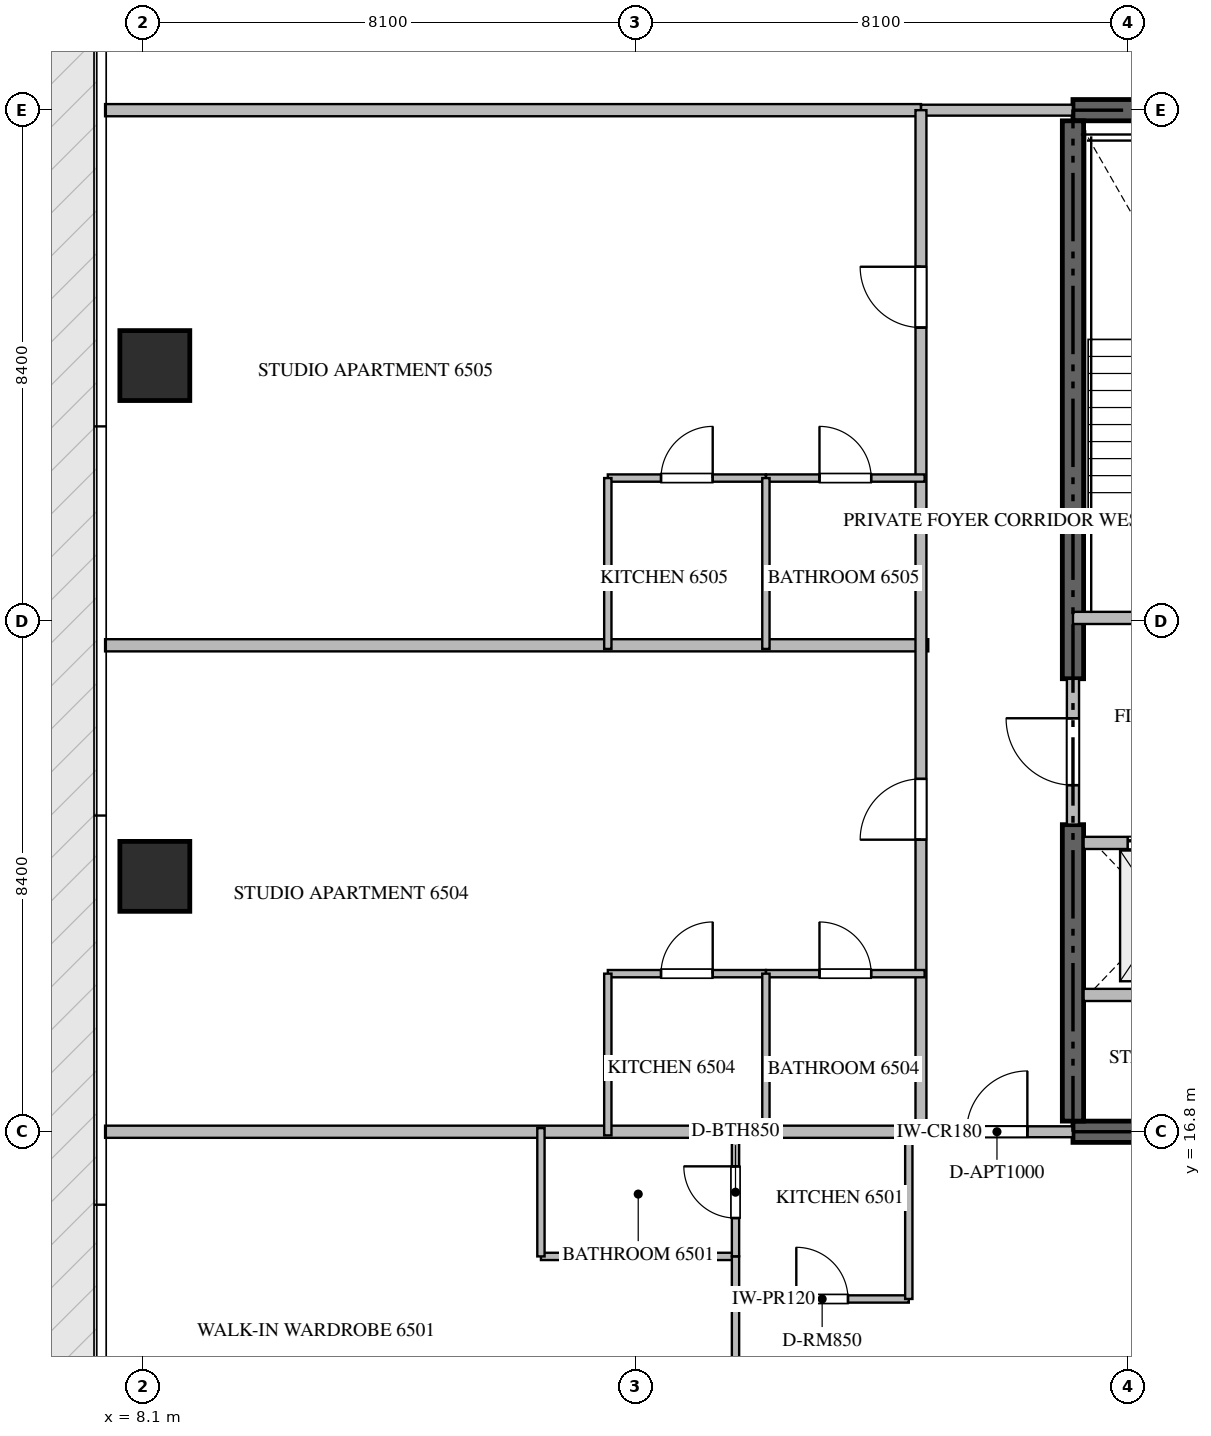
"""IFC4 building model, lengths in metres.
Left out: names, types, materials, properties, quantities, classifications, styles, units other than length and angle.
Written with IfcOpenShell. Run it as: python <this file> out.ifc"""

import sys

from ifc_helpers import new_model, si_unit, direction, frame, frame_2d, origin, origin_2d, place, context, subcontext, project, spatial, rectangle, extrude, source, transform, mapped, element, fill, save


model = new_model("IFC4")
c1 = context("Model", 3, precision=1e-05, world=origin(), true_north=direction((0.0, 1.0)))
c2 = subcontext(c1, "Body", "Model", "MODEL_VIEW")
j1 = project(units=[si_unit("LENGTHUNIT", "METRE"), si_unit("PLANEANGLEUNIT", "RADIAN")], contexts=[c1])
p1 = place(None, origin())
s1 = spatial("IfcSite", under=j1, at=p1, CompositionType="ELEMENT")
p2 = place(p1, origin())
s2 = spatial("IfcBuilding", under=s1, at=p2, CompositionType="ELEMENT")
p3 = place(p2, frame((0.0, 0.0, 260.5)))
s3 = spatial("IfcBuildingStorey", under=s2, at=p3, CompositionType="ELEMENT", Elevation=260.5)
for number, where, z_axis, x_axis in (
    (1, (23.4, 16.8, -0.26), (0.0, 0.0, 1.0), (1.0, 0.0, 0.0)),
    (2, (41.4, 33.6, -0.26), (0.0, 0.0, 1.0), (-1.0, 0.0, 0.0)),
):
    element("IfcWall", number, at=place(p3, frame(where, z_axis=z_axis, x_axis=x_axis)), inside=s3, PredefinedType="SHEAR", context=c2, shape_type="SweptSolid", body=[
        extrude(rectangle(XDim=18.0, YDim=0.35, at=frame_2d((9.0, 0.0))), origin(), (0.0, 0.0, 1.0), 3.848),
    ])
p4 = place(p3, frame((23.4, 16.975, -0.26), z_axis=(0.0, 0.0, 1.0), x_axis=(0.0, 1.0, 0.0)))
e3 = element("IfcWall", 3, at=p4, inside=s3, PredefinedType="SHEAR", context=c2, shape_type="SweptSolid", body=[
    extrude(rectangle(XDim=4.875, YDim=0.35, at=frame_2d((2.438, 0.0))), origin(), (0.0, 0.0, 1.0), 3.848),
])
p5 = place(p3, frame((23.4, 24.25, -0.26), z_axis=(0.0, 0.0, 1.0), x_axis=(0.0, 1.0, 0.0)))
e4 = element("IfcWall", 4, at=p5, inside=s3, PredefinedType="SHEAR", context=c2, shape_type="SweptSolid", body=[
    extrude(rectangle(XDim=9.175, YDim=0.35, at=frame_2d((4.587, 0.0))), origin(), (0.0, 0.0, 1.0), 3.848),
])
m1 = source(origin(), c2, "Body", "SweptSolid", [
    extrude(rectangle(XDim=1.15, YDim=1.15, at=origin_2d()), origin(), (0.0, 0.0, 1.0), 3.85),
])
for number, where, z_axis, x_axis in (
    (5, (8.3, 21.0, -0.26), (0.0, 0.0, 1.0), (1.0, 0.0, 0.0)),
    (6, (8.3, 29.4, -0.26), (0.0, 0.0, 1.0), (1.0, 0.0, 0.0)),
):
    element("IfcColumn", number, at=place(p3, frame(where, z_axis=z_axis, x_axis=x_axis)), inside=s3, PredefinedType="COLUMN", context=c2, shape_type="MappedRepresentation", body=[
        mapped(m1, transform((0.0, 0.0, 0.0), scale=1.0)),
    ])
p6 = place(p3, frame((23.4, 25.25, 0.0), z_axis=(0.0, 0.0, 1.0), x_axis=(1.0, 0.0, 0.0)))
e7 = element("IfcWall", 7, at=p6, inside=s3, PredefinedType="STANDARD", context=c2, shape_type="SweptSolid", body=[
    extrude(rectangle(XDim=4.45, YDim=0.2, at=frame_2d((2.225, 0.0))), origin(), (0.0, 0.0, 1.0), 3.59),
])
p7 = place(p6, frame((1.65, 0.0, 0.0)))
e8 = element("IfcOpeningElement", 8, at=p7, cuts=e7, PredefinedType="OPENING", context=c2, shape_type="SweptSolid", body=[
    extrude(rectangle(XDim=1.1, YDim=2.15, at=frame_2d((0.55, 1.075))), frame((0.0, 0.11, 0.0), z_axis=(0.0, -1.0, 0.0), x_axis=(1.0, 0.0, 0.0)), (0.0, 0.0, 1.0), 0.22),
])
p8 = place(p3, frame((23.575, 21.55, 0.0), z_axis=(0.0, 0.0, 1.0), x_axis=(1.0, 0.0, 0.0)))
e9 = element("IfcWall", 9, at=p8, inside=s3, PredefinedType="STANDARD", context=c2, shape_type="SweptSolid", body=[
    extrude(rectangle(XDim=2.475, YDim=0.2, at=frame_2d((1.238, 0.0))), origin(), (0.0, 0.0, 1.0), 3.59),
])
p9 = place(p8, frame((0.725, 0.0, 0.0)))
e10 = element("IfcOpeningElement", 10, at=p9, cuts=e9, PredefinedType="OPENING", context=c2, shape_type="SweptSolid", body=[
    extrude(rectangle(XDim=1.2, YDim=2.2, at=frame_2d((0.6, 1.1))), frame((0.0, 0.11, 0.0), z_axis=(0.0, -1.0, 0.0), x_axis=(1.0, 0.0, 0.0)), (0.0, 0.0, 1.0), 0.22),
])
p10 = place(p3, frame((23.575, 19.05, 0.0), z_axis=(0.0, 0.0, 1.0), x_axis=(1.0, 0.0, 0.0)))
e11 = element("IfcWall", 11, at=p10, inside=s3, PredefinedType="STANDARD", context=c2, shape_type="SweptSolid", body=[
    extrude(rectangle(XDim=2.475, YDim=0.2, at=frame_2d((1.238, 0.0))), origin(), (0.0, 0.0, 1.0), 3.59),
])
p11 = place(p3, frame((23.4, 21.852, 0.0), z_axis=(0.0, 0.0, 1.0), x_axis=(0.0, 1.0, 0.0)))
e12 = element("IfcWall", 12, at=p11, inside=s3, PredefinedType="STANDARD", context=c2, shape_type="SweptSolid", body=[
    extrude(rectangle(XDim=2.396, YDim=0.2, at=frame_2d((1.198, 0.0))), origin(), (0.0, 0.0, 1.0), 3.59),
])
p12 = place(p11, frame((0.648, 0.0, 0.0)))
e13 = element("IfcOpeningElement", 13, at=p12, cuts=e12, PredefinedType="OPENING", context=c2, shape_type="SweptSolid", body=[
    extrude(rectangle(XDim=1.1, YDim=2.15, at=frame_2d((0.55, 1.075))), frame((0.0, 0.11, 0.0), z_axis=(0.0, -1.0, 0.0), x_axis=(1.0, 0.0, 0.0)), (0.0, 0.0, 1.0), 0.22),
])
p13 = place(p3, frame((7.482, 24.8, 0.0), z_axis=(0.0, 0.0, 1.0), x_axis=(1.0, 0.0, 0.0)))
e14 = element("IfcWall", 14, at=p13, inside=s3, PredefinedType="PARTITIONING", context=c2, shape_type="SweptSolid", body=[
    extrude(rectangle(XDim=13.538, YDim=0.2, at=frame_2d((6.769, 0.0))), origin(), (0.0, 0.0, 1.0), 3.59),
])
for number, where, z_axis, x_axis in (
    (15, (7.482, 16.8, 0.0), (0.0, 0.0, 1.0), (1.0, 0.0, 0.0)),
    (16, (7.482, 33.6, 0.0), (0.0, 0.0, 1.0), (1.0, 0.0, 0.0)),
):
    element("IfcWall", number, at=place(p3, frame(where, z_axis=z_axis, x_axis=x_axis)), inside=s3, PredefinedType="PARTITIONING", context=c2, shape_type="SweptSolid", body=[
        extrude(rectangle(XDim=13.418, YDim=0.2, at=frame_2d((6.709, 0.0))), origin(), (0.0, 0.0, 1.0), 3.59),
    ])
p14 = place(p3, frame((20.902, 16.8, 0.0), z_axis=(0.0, 0.0, 1.0), x_axis=(1.0, 0.0, 0.0)))
e17 = element("IfcWall", 17, at=p14, inside=s3, PredefinedType="PARTITIONING", context=c2, shape_type="SweptSolid", body=[
    extrude(rectangle(XDim=2.496, YDim=0.18, at=frame_2d((1.248, 0.0))), origin(), (0.0, 0.0, 1.0), 3.59),
])
p15 = place(p14, frame((0.748, 0.0, 0.0)))
e18 = element("IfcOpeningElement", 18, at=p15, cuts=e17, PredefinedType="OPENING", context=c2, shape_type="SweptSolid", body=[
    extrude(rectangle(XDim=1.0, YDim=2.15, at=frame_2d((0.5, 1.075))), frame((0.0, 0.1, 0.0), z_axis=(0.0, -1.0, 0.0), x_axis=(1.0, 0.0, 0.0)), (0.0, 0.0, 1.0), 0.2),
])
p16 = place(p3, frame((20.902, 33.6, 0.0), z_axis=(0.0, 0.0, 1.0), x_axis=(1.0, 0.0, 0.0)))
e19 = element("IfcWall", 19, at=p16, inside=s3, PredefinedType="PARTITIONING", context=c2, shape_type="SweptSolid", body=[
    extrude(rectangle(XDim=2.496, YDim=0.18, at=frame_2d((1.248, 0.0))), origin(), (0.0, 0.0, 1.0), 3.59),
])
p17 = place(p3, frame((20.9, 16.8, 0.0), z_axis=(0.0, 0.0, 1.0), x_axis=(0.0, 1.0, 0.0)))
e20 = element("IfcWall", 20, at=p17, inside=s3, PredefinedType="PARTITIONING", context=c2, shape_type="SweptSolid", body=[
    extrude(rectangle(XDim=16.8, YDim=0.18, at=frame_2d((8.4, 0.0))), origin(), (0.0, 0.0, 1.0), 3.59),
])
p18 = place(p17, frame((4.803, 0.0, 0.0)))
e21 = element("IfcOpeningElement", 21, at=p18, cuts=e20, PredefinedType="OPENING", context=c2, shape_type="SweptSolid", body=[
    extrude(rectangle(XDim=1.0, YDim=2.15, at=frame_2d((0.5, 1.075))), frame((0.0, 0.1, 0.0), z_axis=(0.0, -1.0, 0.0), x_axis=(1.0, 0.0, 0.0)), (0.0, 0.0, 1.0), 0.2),
])
p19 = place(p17, frame((13.225, 0.0, 0.0)))
e22 = element("IfcOpeningElement", 22, at=p19, cuts=e20, PredefinedType="OPENING", context=c2, shape_type="SweptSolid", body=[
    extrude(rectangle(XDim=1.0, YDim=2.15, at=frame_2d((0.5, 1.075))), frame((0.0, 0.1, 0.0), z_axis=(0.0, -1.0, 0.0), x_axis=(1.0, 0.0, 0.0)), (0.0, 0.0, 1.0), 0.2),
])
p20 = place(p3, frame((17.85, 14.05, 0.0), z_axis=(0.0, 0.0, 1.0), x_axis=(1.0, 0.0, 0.0)))
e23 = element("IfcWall", 23, at=p20, inside=s3, PredefinedType="PARTITIONING", context=c2, shape_type="SweptSolid", body=[
    extrude(rectangle(XDim=2.85, YDim=0.12, at=frame_2d((1.425, 0.0))), origin(), (0.0, 0.0, 1.0), 3.59),
])
p21 = place(p20, frame((1.0, 0.0, 0.0)))
e24 = element("IfcOpeningElement", 24, at=p21, cuts=e23, PredefinedType="OPENING", context=c2, shape_type="SweptSolid", body=[
    extrude(rectangle(XDim=0.85, YDim=2.1, at=frame_2d((0.425, 1.05))), frame((0.0, 0.07, 0.0), z_axis=(0.0, -1.0, 0.0), x_axis=(1.0, 0.0, 0.0)), (0.0, 0.0, 1.0), 0.14),
])
p22 = place(p3, frame((20.7, 14.05, 0.0), z_axis=(0.0, 0.0, 1.0), x_axis=(0.0, 1.0, 0.0)))
e25 = element("IfcWall", 25, at=p22, inside=s3, PredefinedType="PARTITIONING", context=c2, shape_type="SweptSolid", body=[
    extrude(rectangle(XDim=2.81, YDim=0.12, at=frame_2d((1.405, 0.0))), origin(), (0.0, 0.0, 1.0), 3.59),
])
p23 = place(p3, frame((14.65, 14.75, 0.0), z_axis=(0.0, 0.0, 1.0), x_axis=(1.0, 0.0, 0.0)))
e26 = element("IfcWall", 26, at=p23, inside=s3, PredefinedType="PARTITIONING", context=c2, shape_type="SweptSolid", body=[
    extrude(rectangle(XDim=3.2, YDim=0.12, at=frame_2d((1.6, 0.0))), origin(), (0.0, 0.0, 1.0), 3.59),
])
p24 = place(p3, frame((14.65, 14.75, 0.0), z_axis=(0.0, 0.0, 1.0), x_axis=(0.0, 1.0, 0.0)))
e27 = element("IfcWall", 27, at=p24, inside=s3, PredefinedType="PARTITIONING", context=c2, shape_type="SweptSolid", body=[
    extrude(rectangle(XDim=2.11, YDim=0.12, at=frame_2d((1.055, 0.0))), origin(), (0.0, 0.0, 1.0), 3.59),
])
p25 = place(p3, frame((17.85, 10.096, 0.0), z_axis=(0.0, 0.0, 1.0), x_axis=(0.0, 1.0, 0.0)))
e28 = element("IfcWall", 28, at=p25, inside=s3, PredefinedType="PARTITIONING", context=c2, shape_type="SweptSolid", body=[
    extrude(rectangle(XDim=4.654, YDim=0.12, at=frame_2d((2.327, 0.0))), origin(), (0.0, 0.0, 1.0), 3.59),
])
p26 = place(p25, frame((1.902, 0.0, 0.0)))
e29 = element("IfcOpeningElement", 29, at=p26, cuts=e28, PredefinedType="OPENING", context=c2, shape_type="SweptSolid", body=[
    extrude(rectangle(XDim=0.85, YDim=2.1, at=frame_2d((0.425, 1.05))), frame((0.0, 0.07, 0.0), z_axis=(0.0, -1.0, 0.0), x_axis=(1.0, 0.0, 0.0)), (0.0, 0.0, 1.0), 0.14),
])
p27 = place(p3, frame((17.85, 14.752, 0.0), z_axis=(0.0, 0.0, 1.0), x_axis=(0.0, 1.0, 0.0)))
e30 = element("IfcWall", 30, at=p27, inside=s3, PredefinedType="PARTITIONING", context=c2, shape_type="SweptSolid", body=[
    extrude(rectangle(XDim=2.108, YDim=0.12, at=frame_2d((1.054, 0.0))), origin(), (0.0, 0.0, 1.0), 3.59),
])
p28 = place(p27, frame((0.629, 0.0, 0.0)))
e31 = element("IfcOpeningElement", 31, at=p28, cuts=e30, PredefinedType="OPENING", context=c2, shape_type="SweptSolid", body=[
    extrude(rectangle(XDim=0.85, YDim=2.1, at=frame_2d((0.425, 1.05))), frame((0.0, 0.07, 0.0), z_axis=(0.0, -1.0, 0.0), x_axis=(1.0, 0.0, 0.0)), (0.0, 0.0, 1.0), 0.14),
])
p29 = place(p3, frame((15.75, 19.4, 0.0), z_axis=(0.0, 0.0, 1.0), x_axis=(1.0, 0.0, 0.0)))
e32 = element("IfcWall", 32, at=p29, inside=s3, PredefinedType="PARTITIONING", context=c2, shape_type="SweptSolid", body=[
    extrude(rectangle(XDim=2.6, YDim=0.12, at=frame_2d((1.3, 0.0))), origin(), (0.0, 0.0, 1.0), 3.59),
])
p30 = place(p29, frame((0.875, 0.0, 0.0)))
e33 = element("IfcOpeningElement", 33, at=p30, cuts=e32, PredefinedType="OPENING", context=c2, shape_type="SweptSolid", body=[
    extrude(rectangle(XDim=0.85, YDim=2.1, at=frame_2d((0.425, 1.05))), frame((0.0, 0.07, 0.0), z_axis=(0.0, -1.0, 0.0), x_axis=(1.0, 0.0, 0.0)), (0.0, 0.0, 1.0), 0.14),
])
p31 = place(p3, frame((18.352, 19.4, 0.0), z_axis=(0.0, 0.0, 1.0), x_axis=(1.0, 0.0, 0.0)))
e34 = element("IfcWall", 34, at=p31, inside=s3, PredefinedType="PARTITIONING", context=c2, shape_type="SweptSolid", body=[
    extrude(rectangle(XDim=2.608, YDim=0.12, at=frame_2d((1.304, 0.0))), origin(), (0.0, 0.0, 1.0), 3.59),
])
p32 = place(p31, frame((0.879, 0.0, 0.0)))
e35 = element("IfcOpeningElement", 35, at=p32, cuts=e34, PredefinedType="OPENING", context=c2, shape_type="SweptSolid", body=[
    extrude(rectangle(XDim=0.85, YDim=2.1, at=frame_2d((0.425, 1.05))), frame((0.0, 0.07, 0.0), z_axis=(0.0, -1.0, 0.0), x_axis=(1.0, 0.0, 0.0)), (0.0, 0.0, 1.0), 0.14),
])
for number, where, z_axis, x_axis in (
    (36, (18.35, 16.74, 0.0), (0.0, 0.0, 1.0), (0.0, 1.0, 0.0)),
    (37, (15.75, 16.74, 0.0), (0.0, 0.0, 1.0), (0.0, 1.0, 0.0)),
):
    element("IfcWall", number, at=place(p3, frame(where, z_axis=z_axis, x_axis=x_axis)), inside=s3, PredefinedType="PARTITIONING", context=c2, shape_type="SweptSolid", body=[
        extrude(rectangle(XDim=2.66, YDim=0.12, at=frame_2d((1.33, 0.0))), origin(), (0.0, 0.0, 1.0), 3.59),
    ])
p33 = place(p3, frame((15.75, 27.55, 0.0), z_axis=(0.0, 0.0, 1.0), x_axis=(1.0, 0.0, 0.0)))
e38 = element("IfcWall", 38, at=p33, inside=s3, PredefinedType="PARTITIONING", context=c2, shape_type="SweptSolid", body=[
    extrude(rectangle(XDim=2.6, YDim=0.12, at=frame_2d((1.3, 0.0))), origin(), (0.0, 0.0, 1.0), 3.59),
])
p34 = place(p33, frame((0.875, 0.0, 0.0)))
e39 = element("IfcOpeningElement", 39, at=p34, cuts=e38, PredefinedType="OPENING", context=c2, shape_type="SweptSolid", body=[
    extrude(rectangle(XDim=0.85, YDim=2.1, at=frame_2d((0.425, 1.05))), frame((0.0, 0.07, 0.0), z_axis=(0.0, -1.0, 0.0), x_axis=(1.0, 0.0, 0.0)), (0.0, 0.0, 1.0), 0.14),
])
p35 = place(p3, frame((18.352, 27.55, 0.0), z_axis=(0.0, 0.0, 1.0), x_axis=(1.0, 0.0, 0.0)))
e40 = element("IfcWall", 40, at=p35, inside=s3, PredefinedType="PARTITIONING", context=c2, shape_type="SweptSolid", body=[
    extrude(rectangle(XDim=2.608, YDim=0.12, at=frame_2d((1.304, 0.0))), origin(), (0.0, 0.0, 1.0), 3.59),
])
p36 = place(p35, frame((0.879, 0.0, 0.0)))
e41 = element("IfcOpeningElement", 41, at=p36, cuts=e40, PredefinedType="OPENING", context=c2, shape_type="SweptSolid", body=[
    extrude(rectangle(XDim=0.85, YDim=2.1, at=frame_2d((0.425, 1.05))), frame((0.0, 0.07, 0.0), z_axis=(0.0, -1.0, 0.0), x_axis=(1.0, 0.0, 0.0)), (0.0, 0.0, 1.0), 0.14),
])
for number, where, z_axis, x_axis in (
    (42, (18.35, 24.74, 0.0), (0.0, 0.0, 1.0), (0.0, 1.0, 0.0)),
    (43, (15.75, 24.74, 0.0), (0.0, 0.0, 1.0), (0.0, 1.0, 0.0)),
):
    element("IfcWall", number, at=place(p3, frame(where, z_axis=z_axis, x_axis=x_axis)), inside=s3, PredefinedType="PARTITIONING", context=c2, shape_type="SweptSolid", body=[
        extrude(rectangle(XDim=2.81, YDim=0.12, at=frame_2d((1.405, 0.0))), origin(), (0.0, 0.0, 1.0), 3.59),
    ])
m2 = source(origin(), c2, "Body", "SweptSolid", [
    extrude(rectangle(XDim=1.2, YDim=2.2, at=frame_2d((0.6, 1.1))), frame((0.0, 0.025, 0.0), z_axis=(0.0, -1.0, 0.0), x_axis=(1.0, 0.0, 0.0)), (0.0, 0.0, 1.0), 0.05),
])
p37 = place(p9, origin())
e44 = element("IfcDoor", 44, at=p37, inside=s3, OperationType="DOUBLE_DOOR_SLIDING", PredefinedType="DOOR", context=c2, shape_type="MappedRepresentation", body=[
    mapped(m2, transform((0.0, 0.0, 0.0), scale=1.0)),
])
fill(e10, e44)
m3 = source(origin(), c2, "Body", "SweptSolid", [
    extrude(rectangle(XDim=1.1, YDim=2.15, at=frame_2d((0.55, 1.075))), frame((0.0, 0.025, 0.0), z_axis=(0.0, -1.0, 0.0), x_axis=(1.0, 0.0, 0.0)), (0.0, 0.0, 1.0), 0.05),
])
p38 = place(p12, origin())
e45 = element("IfcDoor", 45, at=p38, inside=s3, OperationType="SINGLE_SWING_RIGHT", PredefinedType="DOOR", context=c2, shape_type="MappedRepresentation", body=[
    mapped(m3, transform((0.0, 0.0, 0.0), scale=1.0)),
])
fill(e13, e45)
m4 = source(origin(), c2, "Body", "SweptSolid", [
    extrude(rectangle(XDim=1.0, YDim=2.15, at=frame_2d((0.5, 1.075))), frame((0.0, 0.025, 0.0), z_axis=(0.0, -1.0, 0.0), x_axis=(1.0, 0.0, 0.0)), (0.0, 0.0, 1.0), 0.05),
])
p39 = place(p15, origin())
e46 = element("IfcDoor", 46, at=p39, inside=s3, OperationType="SINGLE_SWING_RIGHT", PredefinedType="DOOR", context=c2, shape_type="MappedRepresentation", body=[
    mapped(m4, transform((0.0, 0.0, 0.0), scale=1.0)),
])
fill(e18, e46)
p40 = place(p18, origin())
e47 = element("IfcDoor", 47, at=p40, inside=s3, OperationType="SINGLE_SWING_LEFT", PredefinedType="DOOR", context=c2, shape_type="MappedRepresentation", body=[
    mapped(m4, transform((0.0, 0.0, 0.0), scale=1.0)),
])
fill(e21, e47)
p41 = place(p19, origin())
e48 = element("IfcDoor", 48, at=p41, inside=s3, OperationType="SINGLE_SWING_RIGHT", PredefinedType="DOOR", context=c2, shape_type="MappedRepresentation", body=[
    mapped(m4, transform((0.0, 0.0, 0.0), scale=1.0)),
])
fill(e22, e48)
m5 = source(origin(), c2, "Body", "SweptSolid", [
    extrude(rectangle(XDim=0.85, YDim=2.1, at=frame_2d((0.425, 1.05))), frame((0.0, 0.025, 0.0), z_axis=(0.0, -1.0, 0.0), x_axis=(1.0, 0.0, 0.0)), (0.0, 0.0, 1.0), 0.05),
])
p42 = place(p21, origin())
e49 = element("IfcDoor", 49, at=p42, inside=s3, OperationType="SINGLE_SWING_LEFT", PredefinedType="DOOR", context=c2, shape_type="MappedRepresentation", body=[
    mapped(m5, transform((0.0, 0.0, 0.0), scale=1.0)),
])
fill(e24, e49)
p43 = place(p28, origin())
e50 = element("IfcDoor", 50, at=p43, inside=s3, OperationType="SINGLE_SWING_RIGHT", PredefinedType="DOOR", context=c2, shape_type="MappedRepresentation", body=[
    mapped(m5, transform((0.0, 0.0, 0.0), scale=1.0)),
])
fill(e31, e50)
p44 = place(p30, origin())
e51 = element("IfcDoor", 51, at=p44, inside=s3, OperationType="SINGLE_SWING_RIGHT", PredefinedType="DOOR", context=c2, shape_type="MappedRepresentation", body=[
    mapped(m5, transform((0.0, 0.0, 0.0), scale=1.0)),
])
fill(e33, e51)
p45 = place(p32, origin())
e52 = element("IfcDoor", 52, at=p45, inside=s3, OperationType="SINGLE_SWING_LEFT", PredefinedType="DOOR", context=c2, shape_type="MappedRepresentation", body=[
    mapped(m5, transform((0.0, 0.0, 0.0), scale=1.0)),
])
fill(e35, e52)
p46 = place(p34, origin())
e53 = element("IfcDoor", 53, at=p46, inside=s3, OperationType="SINGLE_SWING_RIGHT", PredefinedType="DOOR", context=c2, shape_type="MappedRepresentation", body=[
    mapped(m5, transform((0.0, 0.0, 0.0), scale=1.0)),
])
fill(e39, e53)
p47 = place(p36, origin())
e54 = element("IfcDoor", 54, at=p47, inside=s3, OperationType="SINGLE_SWING_LEFT", PredefinedType="DOOR", context=c2, shape_type="MappedRepresentation", body=[
    mapped(m5, transform((0.0, 0.0, 0.0), scale=1.0)),
])
fill(e41, e54)
save(model, sys.argv[1])
